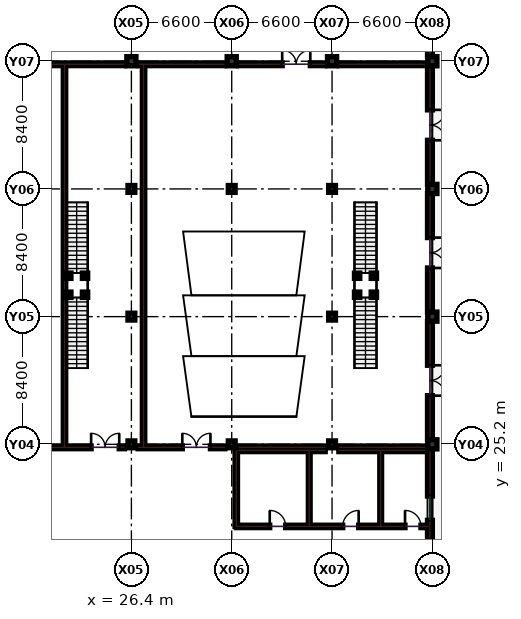
"""IFC4 building model, lengths in metres.
Left out: names, types, materials, properties, quantities, classifications, styles, units other than length and angle.
Written with IfcOpenShell. Run it as: python <this file> out.ifc"""

import sys

from ifc_helpers import new_model, si_unit, direction, frame, frame_2d, origin, origin_2d, place, context, subcontext, project, spatial, rectangle, extrude, element, fill, save


model = new_model("IFC4")
c1 = context("Model", 3, precision=1e-05, world=origin(), true_north=direction((0.0, 1.0)))
c2 = subcontext(c1, "Body", "Model", "MODEL_VIEW")
j1 = project(units=[si_unit("LENGTHUNIT", "METRE"), si_unit("PLANEANGLEUNIT", "RADIAN")], contexts=[c1])
p1 = place(None, origin())
s1 = spatial("IfcSite", under=j1, at=p1, CompositionType="ELEMENT")
p2 = place(p1, origin())
s2 = spatial("IfcBuilding", under=s1, at=p2, CompositionType="ELEMENT")
p3 = place(p2, origin())
s3 = spatial("IfcBuildingStorey", under=s2, at=p3, CompositionType="ELEMENT", Elevation=0.0)
for number, where, z_axis, x_axis in (
    (1, (26.4, 25.2, 0.0), (0.0, 0.0, 1.0), (1.0, 0.0, 0.0)),
    (2, (26.4, 33.6, 0.0), (0.0, 0.0, 1.0), (1.0, 0.0, 0.0)),
    (3, (26.4, 42.0, 0.0), (0.0, 0.0, 1.0), (1.0, 0.0, 0.0)),
):
    element("IfcColumn", number, at=place(p3, frame(where, z_axis=z_axis, x_axis=x_axis)), inside=s3, PredefinedType="COLUMN", context=c2, shape_type="SweptSolid", body=[
        extrude(rectangle(XDim=0.45, YDim=0.45, at=origin_2d()), origin(), (0.0, 0.0, 1.0), 5.4),
    ])
p4 = place(p3, frame((26.4, 50.4, 0.0), z_axis=(0.0, 0.0, 1.0), x_axis=(1.0, 0.0, 0.0)))
e4 = element("IfcColumn", 4, at=p4, inside=s3, PredefinedType="COLUMN", context=c2, shape_type="SweptSolid", body=[
    extrude(rectangle(XDim=0.6, YDim=0.6, at=origin_2d()), origin(), (0.0, 0.0, 1.0), 5.4),
])
for number, where, z_axis, x_axis in (
    (5, (33.0, 25.2, 0.0), (0.0, 0.0, 1.0), (1.0, 0.0, 0.0)),
    (6, (33.0, 42.0, 0.0), (0.0, 0.0, 1.0), (1.0, 0.0, 0.0)),
):
    element("IfcColumn", number, at=place(p3, frame(where, z_axis=z_axis, x_axis=x_axis)), inside=s3, PredefinedType="COLUMN", context=c2, shape_type="SweptSolid", body=[
        extrude(rectangle(XDim=0.45, YDim=0.45, at=origin_2d()), origin(), (0.0, 0.0, 1.0), 5.4),
    ])
p5 = place(p3, frame((33.0, 50.4, 0.0), z_axis=(0.0, 0.0, 1.0), x_axis=(1.0, 0.0, 0.0)))
e7 = element("IfcColumn", 7, at=p5, inside=s3, PredefinedType="COLUMN", context=c2, shape_type="SweptSolid", body=[
    extrude(rectangle(XDim=0.6, YDim=0.6, at=origin_2d()), origin(), (0.0, 0.0, 1.0), 5.4),
])
for number, where, z_axis, x_axis in (
    (8, (39.6, 25.2, 0.0), (0.0, 0.0, 1.0), (1.0, 0.0, 0.0)),
    (9, (39.6, 33.6, 0.0), (0.0, 0.0, 1.0), (1.0, 0.0, 0.0)),
    (10, (39.6, 42.0, 0.0), (0.0, 0.0, 1.0), (1.0, 0.0, 0.0)),
):
    element("IfcColumn", number, at=place(p3, frame(where, z_axis=z_axis, x_axis=x_axis)), inside=s3, PredefinedType="COLUMN", context=c2, shape_type="SweptSolid", body=[
        extrude(rectangle(XDim=0.45, YDim=0.45, at=origin_2d()), origin(), (0.0, 0.0, 1.0), 5.4),
    ])
for number, where, z_axis, x_axis in (
    (11, (39.6, 50.4, 0.0), (0.0, 0.0, 1.0), (1.0, 0.0, 0.0)),
    (12, (46.2, 25.2, 0.0), (0.0, 0.0, 1.0), (1.0, 0.0, 0.0)),
    (13, (46.2, 33.6, 0.0), (0.0, 0.0, 1.0), (1.0, 0.0, 0.0)),
    (14, (46.2, 42.0, 0.0), (0.0, 0.0, 1.0), (1.0, 0.0, 0.0)),
    (15, (46.2, 50.4, 0.0), (0.0, 0.0, 1.0), (1.0, 0.0, 0.0)),
):
    element("IfcColumn", number, at=place(p3, frame(where, z_axis=z_axis, x_axis=x_axis)), inside=s3, PredefinedType="COLUMN", context=c2, shape_type="SweptSolid", body=[
        extrude(rectangle(XDim=0.6, YDim=0.6, at=origin_2d()), origin(), (0.0, 0.0, 1.0), 5.4),
    ])
p6 = place(p3, frame((33.3, 19.8, 0.0), z_axis=(0.0, 0.0, 1.0), x_axis=(1.0, 0.0, 0.0)))
e16 = element("IfcWall", 16, at=p6, inside=s3, PredefinedType="PARTITIONING", context=c2, shape_type="SweptSolid", body=[
    extrude(rectangle(XDim=12.65, YDim=0.16, at=frame_2d((6.325, 0.0))), origin(), (0.0, 0.0, 1.0), 4.25),
])
p7 = place(p6, frame((2.2, 0.0, 0.0)))
e17 = element("IfcOpeningElement", 17, at=p7, cuts=e16, PredefinedType="OPENING", context=c2, shape_type="SweptSolid", body=[
    extrude(rectangle(XDim=1.05, YDim=2.15, at=frame_2d((0.525, 1.075))), frame((0.0, 0.09, 0.0), z_axis=(0.0, -1.0, 0.0), x_axis=(1.0, 0.0, 0.0)), (0.0, 0.0, 1.0), 0.18),
])
p8 = place(p6, frame((7.0, 0.0, 0.0)))
e18 = element("IfcOpeningElement", 18, at=p8, cuts=e16, PredefinedType="OPENING", context=c2, shape_type="SweptSolid", body=[
    extrude(rectangle(XDim=1.05, YDim=2.15, at=frame_2d((0.525, 1.075))), frame((0.0, 0.09, 0.0), z_axis=(0.0, -1.0, 0.0), x_axis=(1.0, 0.0, 0.0)), (0.0, 0.0, 1.0), 0.18),
])
p9 = place(p6, frame((11.1, 0.0, 0.0)))
e19 = element("IfcOpeningElement", 19, at=p9, cuts=e16, PredefinedType="OPENING", context=c2, shape_type="SweptSolid", body=[
    extrude(rectangle(XDim=1.05, YDim=2.15, at=frame_2d((0.525, 1.075))), frame((0.0, 0.09, 0.0), z_axis=(0.0, -1.0, 0.0), x_axis=(1.0, 0.0, 0.0)), (0.0, 0.0, 1.0), 0.18),
])
p10 = place(p3, frame((33.3, 24.8, 0.0), z_axis=(0.0, 0.0, 1.0), x_axis=(1.0, 0.0, 0.0)))
e20 = element("IfcWall", 20, at=p10, inside=s3, PredefinedType="PARTITIONING", context=c2, shape_type="SweptSolid", body=[
    extrude(rectangle(XDim=5.85, YDim=0.16, at=frame_2d((2.925, 0.0))), origin(), (0.0, 0.0, 1.0), 4.25),
])
p11 = place(p3, frame((40.05, 24.8, 0.0), z_axis=(0.0, 0.0, 1.0), x_axis=(1.0, 0.0, 0.0)))
e21 = element("IfcWall", 21, at=p11, inside=s3, PredefinedType="PARTITIONING", context=c2, shape_type="SweptSolid", body=[
    extrude(rectangle(XDim=5.9, YDim=0.16, at=frame_2d((2.95, 0.0))), origin(), (0.0, 0.0, 1.0), 4.25),
])
p12 = place(p3, frame((33.3, 19.8, 0.0), z_axis=(0.0, 0.0, 1.0), x_axis=(0.0, 1.0, 0.0)))
e22 = element("IfcWall", 22, at=p12, inside=s3, PredefinedType="PARTITIONING", context=c2, shape_type="SweptSolid", body=[
    extrude(rectangle(XDim=5.0, YDim=0.16, at=frame_2d((2.5, 0.0))), origin(), (0.0, 0.0, 1.0), 4.25),
])
for number, where, z_axis, x_axis in (
    (23, (38.1, 19.8, 0.0), (0.0, 0.0, 1.0), (0.0, 1.0, 0.0)),
    (24, (42.8, 19.8, 0.0), (0.0, 0.0, 1.0), (0.0, 1.0, 0.0)),
):
    element("IfcWall", number, at=place(p3, frame(where, z_axis=z_axis, x_axis=x_axis)), inside=s3, PredefinedType="PARTITIONING", context=c2, shape_type="SweptSolid", body=[
        extrude(rectangle(XDim=5.0, YDim=0.12, at=frame_2d((2.5, 0.0))), origin(), (0.0, 0.0, 1.0), 4.25),
    ])
p13 = place(p3, frame((20.25, 25.0, 0.0), z_axis=(0.0, 0.0, 1.0), x_axis=(1.0, 0.0, 0.0)))
e25 = element("IfcWall", 25, at=p13, inside=s3, PredefinedType="SOLIDWALL", context=c2, shape_type="SweptSolid", body=[
    extrude(rectangle(XDim=5.7, YDim=0.18, at=frame_2d((2.85, 0.0))), origin(), (0.0, 0.0, 1.0), 4.235),
])
p14 = place(p13, frame((3.5, 0.0, 0.0)))
e26 = element("IfcOpeningElement", 26, at=p14, cuts=e25, PredefinedType="OPENING", context=c2, shape_type="SweptSolid", body=[
    extrude(rectangle(XDim=1.85, YDim=2.25, at=frame_2d((0.925, 1.125))), frame((0.0, 0.1, 0.0), z_axis=(0.0, -1.0, 0.0), x_axis=(1.0, 0.0, 0.0)), (0.0, 0.0, 1.0), 0.2),
])
p15 = place(p3, frame((26.85, 25.0, 0.0), z_axis=(0.0, 0.0, 1.0), x_axis=(1.0, 0.0, 0.0)))
e27 = element("IfcWall", 27, at=p15, inside=s3, PredefinedType="SOLIDWALL", context=c2, shape_type="SweptSolid", body=[
    extrude(rectangle(XDim=5.7, YDim=0.18, at=frame_2d((2.85, 0.0))), origin(), (0.0, 0.0, 1.0), 4.235),
])
p16 = place(p15, frame((2.9, 0.0, 0.0)))
e28 = element("IfcOpeningElement", 28, at=p16, cuts=e27, PredefinedType="OPENING", context=c2, shape_type="SweptSolid", body=[
    extrude(rectangle(XDim=1.85, YDim=2.25, at=frame_2d((0.925, 1.125))), frame((0.0, 0.1, 0.0), z_axis=(0.0, -1.0, 0.0), x_axis=(1.0, 0.0, 0.0)), (0.0, 0.0, 1.0), 0.2),
])
p17 = place(p3, frame((33.45, 25.0, 0.0), z_axis=(0.0, 0.0, 1.0), x_axis=(1.0, 0.0, 0.0)))
e29 = element("IfcWall", 29, at=p17, inside=s3, PredefinedType="SOLIDWALL", context=c2, shape_type="SweptSolid", body=[
    extrude(rectangle(XDim=5.7, YDim=0.18, at=frame_2d((2.85, 0.0))), origin(), (0.0, 0.0, 1.0), 4.235),
])
p18 = place(p3, frame((40.05, 25.0, 0.0), z_axis=(0.0, 0.0, 1.0), x_axis=(1.0, 0.0, 0.0)))
e30 = element("IfcWall", 30, at=p18, inside=s3, PredefinedType="SOLIDWALL", context=c2, shape_type="SweptSolid", body=[
    extrude(rectangle(XDim=5.83, YDim=0.18, at=frame_2d((2.915, 0.0))), origin(), (0.0, 0.0, 1.0), 4.235),
])
for number, where, z_axis, x_axis in (
    (31, (22.0, 25.0, 0.0), (0.0, 0.0, 1.0), (0.0, 1.0, 0.0)),
    (32, (27.2, 25.0, 0.0), (0.0, 0.0, 1.0), (0.0, 1.0, 0.0)),
):
    element("IfcWall", number, at=place(p3, frame(where, z_axis=z_axis, x_axis=x_axis)), inside=s3, PredefinedType="PARTITIONING", context=c2, shape_type="SweptSolid", body=[
        extrude(rectangle(XDim=25.2, YDim=0.16, at=frame_2d((12.6, 0.0))), origin(), (0.0, 0.0, 1.0), 4.25),
    ])
for number, where, z_axis, x_axis in (
    (33, (20.25, 50.2, 0.0), (0.0, 0.0, 1.0), (1.0, 0.0, 0.0)),
    (34, (26.85, 50.2, 0.0), (0.0, 0.0, 1.0), (1.0, 0.0, 0.0)),
):
    element("IfcWall", number, at=place(p3, frame(where, z_axis=z_axis, x_axis=x_axis)), inside=s3, PredefinedType="SOLIDWALL", context=c2, shape_type="SweptSolid", body=[
        extrude(rectangle(XDim=5.7, YDim=0.18, at=frame_2d((2.85, 0.0))), origin(), (0.0, 0.0, 1.0), 4.235),
    ])
p19 = place(p3, frame((33.45, 50.2, 0.0), z_axis=(0.0, 0.0, 1.0), x_axis=(1.0, 0.0, 0.0)))
e35 = element("IfcWall", 35, at=p19, inside=s3, PredefinedType="SOLIDWALL", context=c2, shape_type="SweptSolid", body=[
    extrude(rectangle(XDim=5.7, YDim=0.18, at=frame_2d((2.85, 0.0))), origin(), (0.0, 0.0, 1.0), 4.235),
])
p20 = place(p19, frame((2.87, 0.0, 0.0)))
e36 = element("IfcOpeningElement", 36, at=p20, cuts=e35, PredefinedType="OPENING", context=c2, shape_type="SweptSolid", body=[
    extrude(rectangle(XDim=1.85, YDim=2.25, at=frame_2d((0.925, 1.125))), frame((0.0, 0.1, 0.0), z_axis=(0.0, -1.0, 0.0), x_axis=(1.0, 0.0, 0.0)), (0.0, 0.0, 1.0), 0.2),
])
p21 = place(p3, frame((40.05, 50.2, 0.0), z_axis=(0.0, 0.0, 1.0), x_axis=(1.0, 0.0, 0.0)))
e37 = element("IfcWall", 37, at=p21, inside=s3, PredefinedType="SOLIDWALL", context=c2, shape_type="SweptSolid", body=[
    extrude(rectangle(XDim=5.83, YDim=0.18, at=frame_2d((2.915, 0.0))), origin(), (0.0, 0.0, 1.0), 4.235),
])
p22 = place(p3, frame((46.04, 17.095, 0.0), z_axis=(0.0, 0.0, 1.0), x_axis=(0.0, 1.0, 0.0)))
e38 = element("IfcWall", 38, at=p22, inside=s3, PredefinedType="SOLIDWALL", context=c2, shape_type="SweptSolid", body=[
    extrude(rectangle(XDim=7.81, YDim=0.32, at=frame_2d((3.905, 0.0))), origin(), (0.0, 0.0, 1.0), 4.335),
])
p23 = place(p22, frame((3.105, 0.0, 0.95)))
e39 = element("IfcOpeningElement", 39, at=p23, cuts=e38, PredefinedType="OPENING", context=c2, shape_type="SweptSolid", body=[
    extrude(rectangle(XDim=1.6, YDim=1.85, at=frame_2d((0.8, 0.925))), frame((0.0, 0.17, 0.0), z_axis=(0.0, -1.0, 0.0), x_axis=(1.0, 0.0, 0.0)), (0.0, 0.0, 1.0), 0.34),
])
p24 = place(p3, frame((46.04, 25.495, 0.0), z_axis=(0.0, 0.0, 1.0), x_axis=(0.0, 1.0, 0.0)))
e40 = element("IfcWall", 40, at=p24, inside=s3, PredefinedType="SOLIDWALL", context=c2, shape_type="SweptSolid", body=[
    extrude(rectangle(XDim=7.81, YDim=0.32, at=frame_2d((3.905, 0.0))), origin(), (0.0, 0.0, 1.0), 4.335),
])
p25 = place(p24, frame((2.905, 0.0, 0.0)))
e41 = element("IfcOpeningElement", 41, at=p25, cuts=e40, PredefinedType="OPENING", context=c2, shape_type="SweptSolid", body=[
    extrude(rectangle(XDim=2.0, YDim=2.4, at=frame_2d((1.0, 1.2))), frame((0.0, 0.17, 0.0), z_axis=(0.0, -1.0, 0.0), x_axis=(1.0, 0.0, 0.0)), (0.0, 0.0, 1.0), 0.34),
])
p26 = place(p3, frame((46.04, 33.895, 0.0), z_axis=(0.0, 0.0, 1.0), x_axis=(0.0, 1.0, 0.0)))
e42 = element("IfcWall", 42, at=p26, inside=s3, PredefinedType="SOLIDWALL", context=c2, shape_type="SweptSolid", body=[
    extrude(rectangle(XDim=7.81, YDim=0.32, at=frame_2d((3.905, 0.0))), origin(), (0.0, 0.0, 1.0), 4.335),
])
p27 = place(p26, frame((2.905, 0.0, 0.0)))
e43 = element("IfcOpeningElement", 43, at=p27, cuts=e42, PredefinedType="OPENING", context=c2, shape_type="SweptSolid", body=[
    extrude(rectangle(XDim=2.0, YDim=2.4, at=frame_2d((1.0, 1.2))), frame((0.0, 0.17, 0.0), z_axis=(0.0, -1.0, 0.0), x_axis=(1.0, 0.0, 0.0)), (0.0, 0.0, 1.0), 0.34),
])
p28 = place(p3, frame((46.04, 42.295, 0.0), z_axis=(0.0, 0.0, 1.0), x_axis=(0.0, 1.0, 0.0)))
e44 = element("IfcWall", 44, at=p28, inside=s3, PredefinedType="SOLIDWALL", context=c2, shape_type="SweptSolid", body=[
    extrude(rectangle(XDim=7.81, YDim=0.32, at=frame_2d((3.905, 0.0))), origin(), (0.0, 0.0, 1.0), 4.335),
])
p29 = place(p28, frame((2.905, 0.0, 0.0)))
e45 = element("IfcOpeningElement", 45, at=p29, cuts=e44, PredefinedType="OPENING", context=c2, shape_type="SweptSolid", body=[
    extrude(rectangle(XDim=2.0, YDim=2.4, at=frame_2d((1.0, 1.2))), frame((0.0, 0.17, 0.0), z_axis=(0.0, -1.0, 0.0), x_axis=(1.0, 0.0, 0.0)), (0.0, 0.0, 1.0), 0.34),
])
p30 = place(p3, frame((46.04, 50.695, 0.0), z_axis=(0.0, 0.0, 1.0), x_axis=(0.0, 1.0, 0.0)))
e46 = element("IfcWall", 46, at=p30, inside=s3, PredefinedType="SOLIDWALL", context=c2, shape_type="SweptSolid", body=[
    extrude(rectangle(XDim=7.81, YDim=0.32, at=frame_2d((3.905, 0.0))), origin(), (0.0, 0.0, 1.0), 4.335),
])
p31 = place(p30, frame((2.905, 0.0, 0.0)))
e47 = element("IfcOpeningElement", 47, at=p31, cuts=e46, PredefinedType="OPENING", context=c2, shape_type="SweptSolid", body=[
    extrude(rectangle(XDim=2.0, YDim=2.4, at=frame_2d((1.0, 1.2))), frame((0.0, 0.17, 0.0), z_axis=(0.0, -1.0, 0.0), x_axis=(1.0, 0.0, 0.0)), (0.0, 0.0, 1.0), 0.34),
])
for number, where, z_axis, x_axis in (
    (48, (22.25, 35.04, 0.0), (0.0, 0.0, 1.0), (1.0, 0.0, 0.0)),
    (49, (23.35, 35.04, 0.0), (0.0, 0.0, 1.0), (1.0, 0.0, 0.0)),
    (50, (23.35, 36.29, 0.0), (0.0, 0.0, 1.0), (1.0, 0.0, 0.0)),
    (51, (22.25, 36.29, 0.0), (0.0, 0.0, 1.0), (1.0, 0.0, 0.0)),
    (52, (41.25, 35.04, 0.0), (0.0, 0.0, 1.0), (1.0, 0.0, 0.0)),
    (53, (42.35, 35.04, 0.0), (0.0, 0.0, 1.0), (1.0, 0.0, 0.0)),
    (54, (42.35, 36.29, 0.0), (0.0, 0.0, 1.0), (1.0, 0.0, 0.0)),
    (55, (41.25, 36.29, 0.0), (0.0, 0.0, 1.0), (1.0, 0.0, 0.0)),
):
    element("IfcColumn", number, at=place(p3, frame(where, z_axis=z_axis, x_axis=x_axis)), inside=s3, PredefinedType="COLUMN", context=c2, shape_type="SweptSolid", body=[
        extrude(rectangle(XDim=0.35, YDim=0.35, at=origin_2d()), origin(), (0.0, 0.0, 1.0), 2.49),
    ])
p32 = place(p7, origin())
e56 = element("IfcDoor", 56, at=p32, inside=s3, OperationType="SINGLE_SWING_LEFT", PredefinedType="DOOR", context=c2, shape_type="SweptSolid", body=[
    extrude(rectangle(XDim=1.05, YDim=2.15, at=frame_2d((0.525, 1.075))), frame((0.0, 0.025, 0.0), z_axis=(0.0, -1.0, 0.0), x_axis=(1.0, 0.0, 0.0)), (0.0, 0.0, 1.0), 0.05),
])
fill(e17, e56)
p33 = place(p8, origin())
e57 = element("IfcDoor", 57, at=p33, inside=s3, OperationType="SINGLE_SWING_RIGHT", PredefinedType="DOOR", context=c2, shape_type="SweptSolid", body=[
    extrude(rectangle(XDim=1.05, YDim=2.15, at=frame_2d((0.525, 1.075))), frame((0.0, 0.025, 0.0), z_axis=(0.0, -1.0, 0.0), x_axis=(1.0, 0.0, 0.0)), (0.0, 0.0, 1.0), 0.05),
])
fill(e18, e57)
p34 = place(p9, origin())
e58 = element("IfcDoor", 58, at=p34, inside=s3, OperationType="SINGLE_SWING_LEFT", PredefinedType="DOOR", context=c2, shape_type="SweptSolid", body=[
    extrude(rectangle(XDim=1.05, YDim=2.15, at=frame_2d((0.525, 1.075))), frame((0.0, 0.025, 0.0), z_axis=(0.0, -1.0, 0.0), x_axis=(1.0, 0.0, 0.0)), (0.0, 0.0, 1.0), 0.05),
])
fill(e19, e58)
p35 = place(p14, origin())
e59 = element("IfcDoor", 59, at=p35, inside=s3, OperationType="DOUBLE_DOOR_SINGLE_SWING", PredefinedType="DOOR", context=c2, shape_type="SweptSolid", body=[
    extrude(rectangle(XDim=1.85, YDim=2.25, at=frame_2d((0.925, 1.125))), frame((0.0, 0.025, 0.0), z_axis=(0.0, -1.0, 0.0), x_axis=(1.0, 0.0, 0.0)), (0.0, 0.0, 1.0), 0.05),
])
fill(e26, e59)
p36 = place(p16, origin())
e60 = element("IfcDoor", 60, at=p36, inside=s3, OperationType="DOUBLE_DOOR_SINGLE_SWING", PredefinedType="DOOR", context=c2, shape_type="SweptSolid", body=[
    extrude(rectangle(XDim=1.85, YDim=2.25, at=frame_2d((0.925, 1.125))), frame((0.0, 0.025, 0.0), z_axis=(0.0, -1.0, 0.0), x_axis=(1.0, 0.0, 0.0)), (0.0, 0.0, 1.0), 0.05),
])
fill(e28, e60)
p37 = place(p20, origin())
e61 = element("IfcDoor", 61, at=p37, inside=s3, OperationType="DOUBLE_DOOR_SINGLE_SWING", PredefinedType="DOOR", context=c2, shape_type="SweptSolid", body=[
    extrude(rectangle(XDim=1.85, YDim=2.25, at=frame_2d((0.925, 1.125))), frame((0.0, 0.025, 0.0), z_axis=(0.0, -1.0, 0.0), x_axis=(1.0, 0.0, 0.0)), (0.0, 0.0, 1.0), 0.05),
])
fill(e36, e61)
p38 = place(p23, origin())
e62 = element("IfcWindow", 62, at=p38, inside=s3, PartitioningType="SINGLE_PANEL", PredefinedType="WINDOW", context=c2, shape_type="SweptSolid", body=[
    extrude(rectangle(XDim=1.6, YDim=1.85, at=frame_2d((0.8, 0.925))), frame((0.0, 0.03, 0.0), z_axis=(0.0, -1.0, 0.0), x_axis=(1.0, 0.0, 0.0)), (0.0, 0.0, 1.0), 0.06),
])
fill(e39, e62)
p39 = place(p25, frame((2.0, 0.0, 0.0), z_axis=(0.0, 0.0, 1.0), x_axis=(-1.0, 0.0, 0.0)))
e63 = element("IfcDoor", 63, at=p39, inside=s3, OperationType="DOUBLE_DOOR_SINGLE_SWING", PredefinedType="DOOR", context=c2, shape_type="SweptSolid", body=[
    extrude(rectangle(XDim=2.0, YDim=2.4, at=frame_2d((1.0, 1.2))), frame((0.0, 0.025, 0.0), z_axis=(0.0, -1.0, 0.0), x_axis=(1.0, 0.0, 0.0)), (0.0, 0.0, 1.0), 0.05),
])
fill(e41, e63)
p40 = place(p27, frame((2.0, 0.0, 0.0), z_axis=(0.0, 0.0, 1.0), x_axis=(-1.0, 0.0, 0.0)))
e64 = element("IfcDoor", 64, at=p40, inside=s3, OperationType="DOUBLE_DOOR_SINGLE_SWING", PredefinedType="DOOR", context=c2, shape_type="SweptSolid", body=[
    extrude(rectangle(XDim=2.0, YDim=2.4, at=frame_2d((1.0, 1.2))), frame((0.0, 0.025, 0.0), z_axis=(0.0, -1.0, 0.0), x_axis=(1.0, 0.0, 0.0)), (0.0, 0.0, 1.0), 0.05),
])
fill(e43, e64)
p41 = place(p29, frame((2.0, 0.0, 0.0), z_axis=(0.0, 0.0, 1.0), x_axis=(-1.0, 0.0, 0.0)))
e65 = element("IfcDoor", 65, at=p41, inside=s3, OperationType="DOUBLE_DOOR_SINGLE_SWING", PredefinedType="DOOR", context=c2, shape_type="SweptSolid", body=[
    extrude(rectangle(XDim=2.0, YDim=2.4, at=frame_2d((1.0, 1.2))), frame((0.0, 0.025, 0.0), z_axis=(0.0, -1.0, 0.0), x_axis=(1.0, 0.0, 0.0)), (0.0, 0.0, 1.0), 0.05),
])
fill(e45, e65)
save(model, sys.argv[1])
